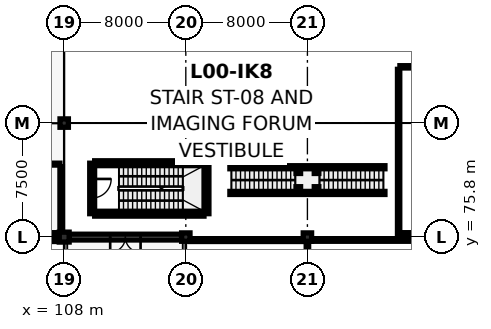
"""IFC4 building model, lengths in metres.
Left out: names, types, materials, properties, quantities, classifications, styles, units other than length and angle.
Written with IfcOpenShell. Run it as: python <this file> out.ifc"""

import sys

from ifc_helpers import new_model, si_unit, direction, frame, frame_2d, origin, origin_2d, place, context, subcontext, project, spatial, rectangle, circle, i_section, extrude, element, fill, save


model = new_model("IFC4")
c1 = context("Model", 3, precision=1e-05, world=origin(), true_north=direction((0.0, 1.0)))
c2 = subcontext(c1, "Body", "Model", "MODEL_VIEW")
j1 = project(units=[si_unit("LENGTHUNIT", "METRE"), si_unit("PLANEANGLEUNIT", "RADIAN")], contexts=[c1])
p1 = place(None, origin())
s1 = spatial("IfcSite", under=j1, at=p1, CompositionType="ELEMENT")
p2 = place(p1, origin())
s2 = spatial("IfcBuilding", under=s1, at=p2, CompositionType="ELEMENT")
p3 = place(p2, origin())
s3 = spatial("IfcBuildingStorey", under=s2, at=p3, CompositionType="ELEMENT", Elevation=0.0)
p4 = place(p3, frame((108.0, 75.8, 0.0), z_axis=(0.0, 0.0, 1.0), x_axis=(1.0, 0.0, 0.0)))
e1 = element("IfcColumn", 1, at=p4, inside=s3, PredefinedType="COLUMN", context=c2, shape_type="SweptSolid", body=[
    extrude(circle(Radius=0.325, at=origin_2d()), origin(), (0.0, 0.0, 1.0), 4.7),
])
for number, where, z_axis, x_axis in (
    (2, (108.0, 83.3, 0.0), (0.0, 0.0, 1.0), (1.0, 0.0, 0.0)),
    (3, (116.0, 75.8, 0.0), (0.0, 0.0, 1.0), (1.0, 0.0, 0.0)),
    (4, (116.0, 83.3, 0.0), (0.0, 0.0, 1.0), (1.0, 0.0, 0.0)),
    (5, (124.0, 75.8, 0.0), (0.0, 0.0, 1.0), (1.0, 0.0, 0.0)),
    (6, (124.0, 83.3, 0.0), (0.0, 0.0, 1.0), (1.0, 0.0, 0.0)),
):
    element("IfcColumn", number, at=place(p3, frame(where, z_axis=z_axis, x_axis=x_axis)), inside=s3, PredefinedType="COLUMN", context=c2, shape_type="SweptSolid", body=[
        extrude(rectangle(XDim=0.55, YDim=0.55, at=origin_2d()), origin(), (0.0, 0.0, 1.0), 4.7),
    ])
p5 = place(p3, frame((115.725, 75.8, 0.0), z_axis=(0.0, 0.0, 1.0), x_axis=(-1.0, 0.0, 0.0)))
e7 = element("IfcWall", 7, at=p5, inside=s3, PredefinedType="SOLIDWALL", context=c2, shape_type="SweptSolid", body=[
    extrude(rectangle(XDim=7.4, YDim=0.38, at=frame_2d((3.7, 0.0))), origin(), (0.0, 0.0, 1.0), 3.985),
])
p6 = place(p5, frame((2.7, 0.0, 0.0)))
e8 = element("IfcOpeningElement", 8, at=p6, cuts=e7, PredefinedType="OPENING", context=c2, shape_type="SweptSolid", body=[
    extrude(rectangle(XDim=2.0, YDim=2.35, at=frame_2d((1.0, 1.175))), frame((0.0, 0.202, 0.0), z_axis=(0.0, -1.0, 0.0), x_axis=(1.0, 0.0, 0.0)), (0.0, 0.0, 1.0), 0.404),
])
p7 = place(p3, frame((110.005, 77.34, 0.0), z_axis=(0.0, 0.0, 1.0), x_axis=(1.0, 0.0, 0.0)))
e9 = element("IfcWall", 9, at=p7, inside=s3, PredefinedType="SHEAR", context=c2, shape_type="SweptSolid", body=[
    extrude(rectangle(XDim=7.19, YDim=0.32, at=frame_2d((3.595, 0.0))), origin(), (0.0, 0.0, 1.0), 4.7),
])
p8 = place(p3, frame((117.36, 77.34, 0.0), z_axis=(0.0, 0.0, 1.0), x_axis=(0.0, 1.0, 0.0)))
e10 = element("IfcWall", 10, at=p8, inside=s3, PredefinedType="SHEAR", context=c2, shape_type="SweptSolid", body=[
    extrude(rectangle(XDim=3.32, YDim=0.32, at=frame_2d((1.66, 0.0))), origin(), (0.0, 0.0, 1.0), 4.7),
])
p9 = place(p3, frame((117.195, 80.66, 0.0), z_axis=(0.0, 0.0, 1.0), x_axis=(-1.0, 0.0, 0.0)))
e11 = element("IfcWall", 11, at=p9, inside=s3, PredefinedType="SHEAR", context=c2, shape_type="SweptSolid", body=[
    extrude(rectangle(XDim=7.19, YDim=0.32, at=frame_2d((3.595, 0.0))), origin(), (0.0, 0.0, 1.0), 4.7),
])
p10 = place(p3, frame((109.84, 80.66, 0.0), z_axis=(0.0, 0.0, 1.0), x_axis=(0.0, -1.0, 0.0)))
e12 = element("IfcWall", 12, at=p10, inside=s3, PredefinedType="SHEAR", context=c2, shape_type="SweptSolid", body=[
    extrude(rectangle(XDim=3.32, YDim=0.32, at=frame_2d((1.66, 0.0))), origin(), (0.0, 0.0, 1.0), 4.7),
])
p11 = place(p10, frame((1.035, 0.0, 0.0)))
e13 = element("IfcOpeningElement", 13, at=p11, cuts=e12, PredefinedType="OPENING", context=c2, shape_type="SweptSolid", body=[
    extrude(rectangle(XDim=1.25, YDim=2.2, at=frame_2d((0.625, 1.1))), frame((0.0, 0.172, 0.0), z_axis=(0.0, -1.0, 0.0), x_axis=(1.0, 0.0, 0.0)), (0.0, 0.0, 1.0), 0.344),
])
for number, where, z_axis, x_axis in (
    (14, (118.9, 78.705, 0.0), (0.0, 0.0, 1.0), (1.0, 0.0, 0.0)),
    (15, (118.9, 80.395, 0.0), (0.0, 0.0, 1.0), (1.0, 0.0, 0.0)),
):
    element("IfcWall", number, at=place(p3, frame(where, z_axis=z_axis, x_axis=x_axis)), inside=s3, PredefinedType="PARTITIONING", context=c2, shape_type="SweptSolid", body=[
        extrude(rectangle(XDim=10.2, YDim=0.2, at=frame_2d((5.1, 0.0))), origin(), (0.0, 0.0, 1.0), 2.3),
    ])
for number, where, z_axis, x_axis in (
    (16, (123.4, 78.965, 0.0), (0.0, 0.0, 1.0), (1.0, 0.0, 0.0)),
    (17, (124.6, 78.965, 0.0), (0.0, 0.0, 1.0), (1.0, 0.0, 0.0)),
    (18, (124.6, 80.135, 0.0), (0.0, 0.0, 1.0), (1.0, 0.0, 0.0)),
    (19, (123.4, 80.135, 0.0), (0.0, 0.0, 1.0), (1.0, 0.0, 0.0)),
):
    element("IfcColumn", number, at=place(p3, frame(where, z_axis=z_axis, x_axis=x_axis)), inside=s3, PredefinedType="COLUMN", context=c2, shape_type="SweptSolid", body=[
        extrude(i_section(OverallWidth=0.3, OverallDepth=0.3, WebThickness=0.011, FlangeThickness=0.019, FilletRadius=0.027, at=origin_2d()), origin(), (0.0, 0.0, 1.0), 2.3),
    ])
p12 = place(p3, frame((93.527, 80.6, 0.0), z_axis=(0.0, 0.0, 1.0), x_axis=(1.0, 0.0, 0.0)))
e20 = element("IfcWall", 20, at=p12, inside=s3, PredefinedType="PARTITIONING", context=c2, shape_type="SweptSolid", body=[
    extrude(rectangle(XDim=14.188, YDim=0.125, at=frame_2d((7.094, 0.0))), origin(), (0.0, 0.0, 1.0), 4.035),
])
p13 = place(p12, frame((6.454, 0.0, 0.0)))
e21 = element("IfcOpeningElement", 21, at=p13, cuts=e20, PredefinedType="OPENING", context=c2, shape_type="SweptSolid", body=[
    extrude(rectangle(XDim=1.28, YDim=2.22, at=frame_2d((0.64, 1.11))), frame((0.0, 0.074, 0.0), z_axis=(0.0, -1.0, 0.0), x_axis=(1.0, 0.0, 0.0)), (0.0, 0.0, 1.0), 0.149),
])
p14 = place(p3, frame((130.085, 87.0, 0.0), z_axis=(0.0, 0.0, 1.0), x_axis=(1.0, 0.0, 0.0)))
e22 = element("IfcWall", 22, at=p14, inside=s3, PredefinedType="PARTITIONING", context=c2, shape_type="SweptSolid", body=[
    extrude(rectangle(XDim=8.23, YDim=0.15, at=frame_2d((4.115, 0.0))), origin(), (0.0, 0.0, 1.0), 3.985),
])
p15 = place(p14, frame((3.255, 0.0, 0.0)))
e23 = element("IfcOpeningElement", 23, at=p15, cuts=e22, PredefinedType="OPENING", context=c2, shape_type="SweptSolid", body=[
    extrude(rectangle(XDim=1.72, YDim=2.34, at=frame_2d((0.86, 1.17))), frame((0.0, 0.087, 0.0), z_axis=(0.0, -1.0, 0.0), x_axis=(1.0, 0.0, 0.0)), (0.0, 0.0, 1.0), 0.174),
])
p16 = place(p3, frame((100.727, 75.6, 0.0), z_axis=(0.0, 0.0, 1.0), x_axis=(1.0, 0.0, 0.0)))
e24 = element("IfcWall", 24, at=p16, inside=s3, PredefinedType="PARTITIONING", context=c2, shape_type="SweptSolid", body=[
    extrude(rectangle(XDim=7.005, YDim=0.18, at=frame_2d((3.502, 0.0))), origin(), (0.0, 0.0, 1.0), 3.985),
])
p17 = place(p3, frame((116.287, 75.6, 0.0), z_axis=(0.0, 0.0, 1.0), x_axis=(1.0, 0.0, 0.0)))
e25 = element("IfcWall", 25, at=p17, inside=s3, PredefinedType="PARTITIONING", context=c2, shape_type="SweptSolid", body=[
    extrude(rectangle(XDim=7.461, YDim=0.18, at=frame_2d((3.73, 0.0))), origin(), (0.0, 0.0, 1.0), 3.985),
])
p18 = place(p3, frame((124.252, 75.6, 0.0), z_axis=(0.0, 0.0, 1.0), x_axis=(1.0, 0.0, 0.0)))
e26 = element("IfcWall", 26, at=p18, inside=s3, PredefinedType="PARTITIONING", context=c2, shape_type="SweptSolid", body=[
    extrude(rectangle(XDim=7.461, YDim=0.15, at=frame_2d((3.73, 0.0))), origin(), (0.0, 0.0, 1.0), 3.985),
])
p19 = place(p3, frame((93.852, 76.0, 0.0), z_axis=(0.0, 0.0, 1.0), x_axis=(1.0, 0.0, 0.0)))
e27 = element("IfcWall", 27, at=p19, inside=s3, PredefinedType="PARTITIONING", context=c2, shape_type="SweptSolid", body=[
    extrude(rectangle(XDim=13.88, YDim=0.18, at=frame_2d((6.94, 0.0))), origin(), (0.0, 0.0, 1.0), 4.035),
])
p20 = place(p3, frame((130.085, 76.0, 0.0), z_axis=(0.0, 0.0, 1.0), x_axis=(1.0, 0.0, 0.0)))
e28 = element("IfcWall", 28, at=p20, inside=s3, PredefinedType="PARTITIONING", context=c2, shape_type="SweptSolid", body=[
    extrude(rectangle(XDim=8.23, YDim=0.18, at=frame_2d((4.115, 0.0))), origin(), (0.0, 0.0, 1.0), 3.985),
])
p21 = place(p3, frame((124.0, 57.687, 0.0), z_axis=(0.0, 0.0, 1.0), x_axis=(0.0, 1.0, 0.0)))
e29 = element("IfcWall", 29, at=p21, inside=s3, PredefinedType="PARTITIONING", context=c2, shape_type="SweptSolid", body=[
    extrude(rectangle(XDim=17.826, YDim=0.16, at=frame_2d((8.913, 0.0))), origin(), (0.0, 0.0, 1.0), 3.985),
])
p22 = place(p3, frame((107.8, 76.068, 0.0), z_axis=(0.0, 0.0, 1.0), x_axis=(0.0, 1.0, 0.0)))
e30 = element("IfcWall", 30, at=p22, inside=s3, PredefinedType="PARTITIONING", context=c2, shape_type="SweptSolid", body=[
    extrude(rectangle(XDim=4.367, YDim=0.16, at=frame_2d((2.184, 0.0))), origin(), (0.0, 0.0, 1.0), 4.035),
])
p23 = place(p3, frame((130.0, 75.687, 0.0), z_axis=(0.0, 0.0, 1.0), x_axis=(0.0, 1.0, 0.0)))
e31 = element("IfcWall", 31, at=p23, inside=s3, PredefinedType="PARTITIONING", context=c2, shape_type="SweptSolid", body=[
    extrude(rectangle(XDim=11.148, YDim=0.15, at=frame_2d((5.574, 0.0))), origin(), (0.0, 0.0, 1.0), 3.885),
])
p24 = place(p6, origin())
e32 = element("IfcDoor", 32, at=p24, inside=s3, OperationType="DOUBLE_DOOR_SINGLE_SWING", PredefinedType="DOOR", context=c2, shape_type="SweptSolid", body=[
    extrude(rectangle(XDim=2.0, YDim=2.35, at=frame_2d((1.0, 1.175))), frame((0.0, 0.025, 0.0), z_axis=(0.0, -1.0, 0.0), x_axis=(1.0, 0.0, 0.0)), (0.0, 0.0, 1.0), 0.05),
])
fill(e8, e32)
p25 = place(p11, origin())
e33 = element("IfcDoor", 33, at=p25, inside=s3, OperationType="SINGLE_SWING_LEFT", PredefinedType="DOOR", context=c2, shape_type="SweptSolid", body=[
    extrude(rectangle(XDim=1.25, YDim=2.2, at=frame_2d((0.625, 1.1))), frame((0.0, 0.025, 0.0), z_axis=(0.0, -1.0, 0.0), x_axis=(1.0, 0.0, 0.0)), (0.0, 0.0, 1.0), 0.05),
])
fill(e13, e33)
save(model, sys.argv[1])
